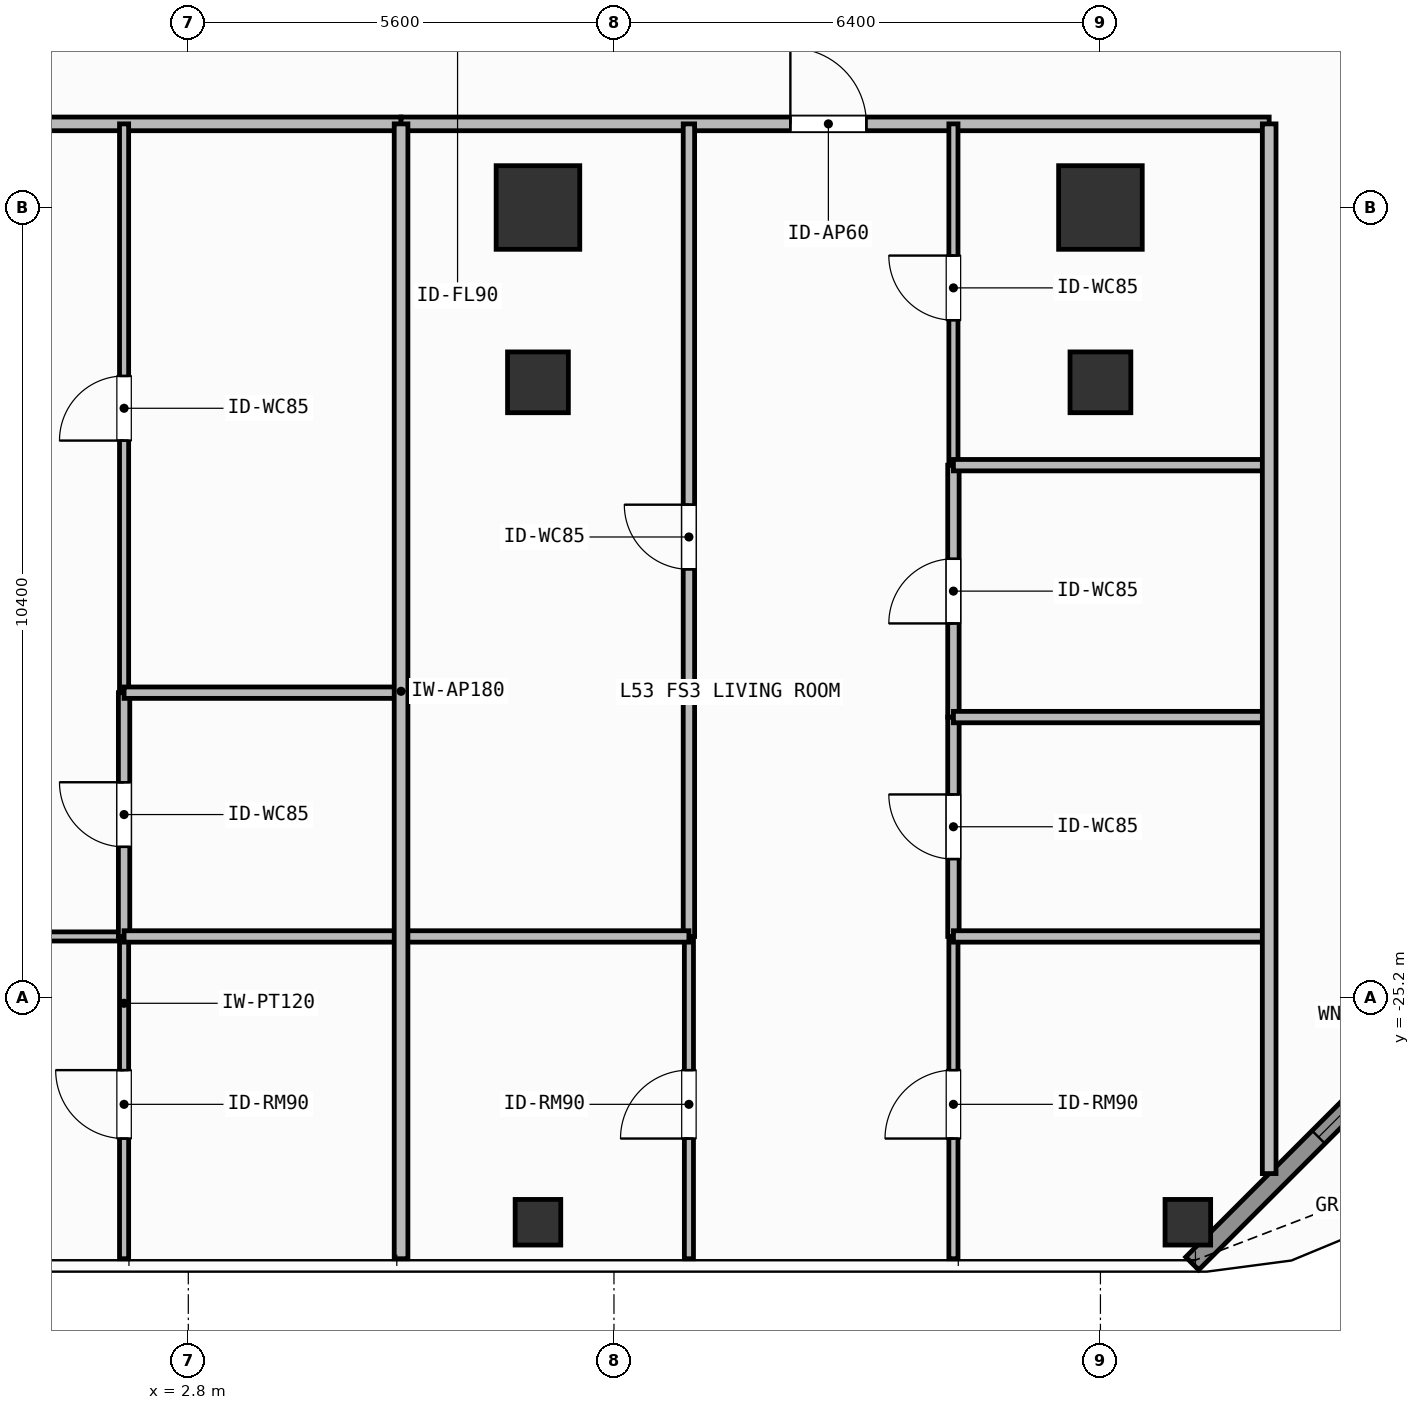
"""IFC4 building model, lengths in metres.
Left out: names, types, materials, properties, quantities, classifications, styles, units other than length and angle.
Written with IfcOpenShell. Run it as: python <this file> out.ifc"""

import sys

from ifc_helpers import new_model, si_unit, direction, frame, frame_2d, origin, origin_2d, place, context, subcontext, project, spatial, rectangle, hollow_rectangle, extrude, element, fill, save


model = new_model("IFC4")
c1 = context("Model", 3, precision=1e-05, world=origin(), true_north=direction((0.0, 1.0)))
c2 = subcontext(c1, "Body", "Model", "MODEL_VIEW")
j1 = project(units=[si_unit("LENGTHUNIT", "METRE"), si_unit("PLANEANGLEUNIT", "RADIAN")], contexts=[c1])
p1 = place(None, origin())
s1 = spatial("IfcSite", under=j1, at=p1, CompositionType="ELEMENT")
p2 = place(p1, origin())
s2 = spatial("IfcBuilding", under=s1, at=p2, CompositionType="ELEMENT")
p3 = place(p2, frame((0.0, 0.0, 215.7)))
s3 = spatial("IfcBuildingStorey", under=s2, at=p3, CompositionType="ELEMENT", Elevation=215.7)
for number, where, z_axis, x_axis in (
    (1, (7.4, -14.8, 0.0), (0.0, 0.0, 1.0), (1.0, 0.0, 0.0)),
    (2, (14.8, -14.8, 0.0), (0.0, 0.0, 1.0), (1.0, 0.0, 0.0)),
):
    element("IfcColumn", number, at=place(p3, frame(where, z_axis=z_axis, x_axis=x_axis)), inside=s3, PredefinedType="COLUMN", context=c2, shape_type="SweptSolid", body=[
        extrude(rectangle(XDim=1.1, YDim=1.1, at=origin_2d()), origin(), (0.0, 0.0, 1.0), 3.9),
    ])
for number, where, z_axis, x_axis in (
    (3, (7.4, -17.1, 0.0), (0.0, 0.0, 1.0), (1.0, 0.0, 0.0)),
    (4, (14.8, -17.1, 0.0), (0.0, 0.0, 1.0), (1.0, 0.0, 0.0)),
):
    element("IfcColumn", number, at=place(p3, frame(where, z_axis=z_axis, x_axis=x_axis)), inside=s3, PredefinedType="COLUMN", context=c2, shape_type="SweptSolid", body=[
        extrude(hollow_rectangle(XDim=0.8, YDim=0.8, WallThickness=0.036, at=origin_2d()), origin(), (0.0, 0.0, 1.0), 3.9),
    ])
for number, where, z_axis, x_axis in (
    (5, (15.95, -28.15, 0.0), (0.0, 0.0, 1.0), (1.0, 0.0, 0.0)),
    (6, (7.4, -28.15, 0.0), (0.0, 0.0, 1.0), (1.0, 0.0, 0.0)),
):
    element("IfcColumn", number, at=place(p3, frame(where, z_axis=z_axis, x_axis=x_axis)), inside=s3, PredefinedType="COLUMN", context=c2, shape_type="SweptSolid", body=[
        extrude(hollow_rectangle(XDim=0.6, YDim=0.6, WallThickness=0.028, at=origin_2d()), origin(), (0.0, 0.0, 1.0), 3.9),
    ])
p4 = place(p3, frame((20.392, -24.308, 0.0), z_axis=(0.0, 0.0, 1.0), x_axis=(-0.707106781187, -0.707106781187, 0.0)))
e7 = element("IfcWall", 7, at=p4, inside=s3, PredefinedType="SOLIDWALL", context=c2, shape_type="SweptSolid", body=[
    extrude(rectangle(XDim=6.201, YDim=0.24, at=frame_2d((3.101, 0.0))), origin(), (0.0, 0.0, 1.0), 3.62),
])
p5 = place(p4, frame((2.351, 0.0, 0.8)))
e8 = element("IfcOpeningElement", 8, at=p5, cuts=e7, PredefinedType="OPENING", context=c2, shape_type="SweptSolid", body=[
    extrude(rectangle(XDim=1.5, YDim=1.85, at=frame_2d((0.75, 0.925))), frame((0.0, 0.13, 0.0), z_axis=(0.0, -1.0, 0.0), x_axis=(1.0, 0.0, 0.0)), (0.0, 0.0, 1.0), 0.26),
])
p6 = place(p3, frame((-10.855, -13.7, 0.0), z_axis=(0.0, 0.0, 1.0), x_axis=(1.0, 0.0, 0.0)))
e9 = element("IfcWall", 9, at=p6, inside=s3, PredefinedType="PARTITIONING", context=c2, shape_type="SweptSolid", body=[
    extrude(rectangle(XDim=16.454, YDim=0.18, at=frame_2d((8.227, 0.0))), origin(), (0.0, 0.0, 1.0), 3.62),
])
p7 = place(p6, frame((8.528, 0.0, 0.0)))
e10 = element("IfcOpeningElement", 10, at=p7, cuts=e9, PredefinedType="OPENING", context=c2, shape_type="SweptSolid", body=[
    extrude(rectangle(XDim=1.0, YDim=2.2, at=frame_2d((0.5, 1.1))), frame((0.0, 0.1, 0.0), z_axis=(0.0, -1.0, 0.0), x_axis=(1.0, 0.0, 0.0)), (0.0, 0.0, 1.0), 0.2),
])
p8 = place(p3, frame((-5.293, -24.39, 0.0), z_axis=(0.0, 0.0, 1.0), x_axis=(1.0, 0.0, 0.0)))
e11 = element("IfcWall", 11, at=p8, inside=s3, PredefinedType="PARTITIONING", context=c2, shape_type="SweptSolid", body=[
    extrude(rectangle(XDim=7.248, YDim=0.12, at=frame_2d((3.624, 0.0))), origin(), (0.0, 0.0, 1.0), 3.62),
])
p9 = place(p8, frame((3.174, 0.0, 0.0)))
e12 = element("IfcOpeningElement", 12, at=p9, cuts=e11, PredefinedType="OPENING", context=c2, shape_type="SweptSolid", body=[
    extrude(rectangle(XDim=0.9, YDim=2.1, at=frame_2d((0.45, 1.05))), frame((0.0, 0.07, 0.0), z_axis=(0.0, -1.0, 0.0), x_axis=(1.0, 0.0, 0.0)), (0.0, 0.0, 1.0), 0.14),
])
p10 = place(p3, frame((1.955, -24.39, 0.0), z_axis=(0.0, 0.0, 1.0), x_axis=(0.0, 1.0, 0.0)))
e13 = element("IfcWall", 13, at=p10, inside=s3, PredefinedType="PARTITIONING", context=c2, shape_type="SweptSolid", body=[
    extrude(rectangle(XDim=3.207, YDim=0.15, at=frame_2d((1.604, 0.0))), origin(), (0.0, 0.0, 1.0), 3.62),
])
p11 = place(p10, frame((1.178, 0.0, 0.0)))
e14 = element("IfcOpeningElement", 14, at=p11, cuts=e13, PredefinedType="OPENING", context=c2, shape_type="SweptSolid", body=[
    extrude(rectangle(XDim=0.85, YDim=2.1, at=frame_2d((0.425, 1.05))), frame((0.0, 0.085, 0.0), z_axis=(0.0, -1.0, 0.0), x_axis=(1.0, 0.0, 0.0)), (0.0, 0.0, 1.0), 0.17),
])
p12 = place(p3, frame((1.955, -21.183, 0.0), z_axis=(0.0, 0.0, 1.0), x_axis=(0.0, 1.0, 0.0)))
e15 = element("IfcWall", 15, at=p12, inside=s3, PredefinedType="PARTITIONING", context=c2, shape_type="SweptSolid", body=[
    extrude(rectangle(XDim=7.483, YDim=0.12, at=frame_2d((3.742, 0.0))), origin(), (0.0, 0.0, 1.0), 3.62),
])
p13 = place(p12, frame((3.316, 0.0, 0.0)))
e16 = element("IfcOpeningElement", 16, at=p13, cuts=e15, PredefinedType="OPENING", context=c2, shape_type="SweptSolid", body=[
    extrude(rectangle(XDim=0.85, YDim=2.1, at=frame_2d((0.425, 1.05))), frame((0.0, 0.07, 0.0), z_axis=(0.0, -1.0, 0.0), x_axis=(1.0, 0.0, 0.0)), (0.0, 0.0, 1.0), 0.14),
])
p14 = place(p3, frame((1.955, -28.63, 0.0), z_axis=(0.0, 0.0, 1.0), x_axis=(0.0, 1.0, 0.0)))
e17 = element("IfcWall", 17, at=p14, inside=s3, PredefinedType="PARTITIONING", context=c2, shape_type="SweptSolid", body=[
    extrude(rectangle(XDim=4.24, YDim=0.12, at=frame_2d((2.12, 0.0))), origin(), (0.0, 0.0, 1.0), 3.62),
])
p15 = place(p14, frame((1.581, 0.0, 0.0)))
e18 = element("IfcOpeningElement", 18, at=p15, cuts=e17, PredefinedType="OPENING", context=c2, shape_type="SweptSolid", body=[
    extrude(rectangle(XDim=0.9, YDim=2.1, at=frame_2d((0.45, 1.05))), frame((0.0, 0.07, 0.0), z_axis=(0.0, -1.0, 0.0), x_axis=(1.0, 0.0, 0.0)), (0.0, 0.0, 1.0), 0.14),
])
p16 = place(p3, frame((5.599, -13.7, 0.0), z_axis=(0.0, 0.0, 1.0), x_axis=(1.0, 0.0, 0.0)))
e19 = element("IfcWall", 19, at=p16, inside=s3, PredefinedType="PARTITIONING", context=c2, shape_type="SweptSolid", body=[
    extrude(rectangle(XDim=11.421, YDim=0.18, at=frame_2d((5.71, 0.0))), origin(), (0.0, 0.0, 1.0), 3.62),
])
p17 = place(p16, frame((5.122, 0.0, 0.0)))
e20 = element("IfcOpeningElement", 20, at=p17, cuts=e19, PredefinedType="OPENING", context=c2, shape_type="SweptSolid", body=[
    extrude(rectangle(XDim=1.0, YDim=2.2, at=frame_2d((0.5, 1.1))), frame((0.0, 0.1, 0.0), z_axis=(0.0, -1.0, 0.0), x_axis=(1.0, 0.0, 0.0)), (0.0, 0.0, 1.0), 0.2),
])
p18 = place(p3, frame((9.386, -24.39, 0.0), z_axis=(0.0, 0.0, 1.0), x_axis=(0.0, 1.0, 0.0)))
e21 = element("IfcWall", 21, at=p18, inside=s3, PredefinedType="PARTITIONING", context=c2, shape_type="SweptSolid", body=[
    extrude(rectangle(XDim=10.69, YDim=0.15, at=frame_2d((5.345, 0.0))), origin(), (0.0, 0.0, 1.0), 3.62),
])
p19 = place(p18, frame((4.83, 0.0, 0.0)))
e22 = element("IfcOpeningElement", 22, at=p19, cuts=e21, PredefinedType="OPENING", context=c2, shape_type="SweptSolid", body=[
    extrude(rectangle(XDim=0.85, YDim=2.1, at=frame_2d((0.425, 1.05))), frame((0.0, 0.085, 0.0), z_axis=(0.0, -1.0, 0.0), x_axis=(1.0, 0.0, 0.0)), (0.0, 0.0, 1.0), 0.17),
])
p20 = place(p3, frame((9.386, -28.63, 0.0), z_axis=(0.0, 0.0, 1.0), x_axis=(0.0, 1.0, 0.0)))
e23 = element("IfcWall", 23, at=p20, inside=s3, PredefinedType="PARTITIONING", context=c2, shape_type="SweptSolid", body=[
    extrude(rectangle(XDim=4.24, YDim=0.12, at=frame_2d((2.12, 0.0))), origin(), (0.0, 0.0, 1.0), 3.62),
])
p21 = place(p20, frame((1.581, 0.0, 0.0)))
e24 = element("IfcOpeningElement", 24, at=p21, cuts=e23, PredefinedType="OPENING", context=c2, shape_type="SweptSolid", body=[
    extrude(rectangle(XDim=0.9, YDim=2.1, at=frame_2d((0.45, 1.05))), frame((0.0, 0.07, 0.0), z_axis=(0.0, -1.0, 0.0), x_axis=(1.0, 0.0, 0.0)), (0.0, 0.0, 1.0), 0.14),
])
p22 = place(p3, frame((12.866, -24.39, 0.0), z_axis=(0.0, 0.0, 1.0), x_axis=(0.0, 1.0, 0.0)))
e25 = element("IfcWall", 25, at=p22, inside=s3, PredefinedType="PARTITIONING", context=c2, shape_type="SweptSolid", body=[
    extrude(rectangle(XDim=2.886, YDim=0.15, at=frame_2d((1.443, 0.0))), origin(), (0.0, 0.0, 1.0), 3.62),
])
p23 = place(p22, frame((1.018, 0.0, 0.0)))
e26 = element("IfcOpeningElement", 26, at=p23, cuts=e25, PredefinedType="OPENING", context=c2, shape_type="SweptSolid", body=[
    extrude(rectangle(XDim=0.85, YDim=2.1, at=frame_2d((0.425, 1.05))), frame((0.0, 0.085, 0.0), z_axis=(0.0, -1.0, 0.0), x_axis=(1.0, 0.0, 0.0)), (0.0, 0.0, 1.0), 0.17),
])
p24 = place(p3, frame((12.866, -21.504, 0.0), z_axis=(0.0, 0.0, 1.0), x_axis=(0.0, 1.0, 0.0)))
e27 = element("IfcWall", 27, at=p24, inside=s3, PredefinedType="PARTITIONING", context=c2, shape_type="SweptSolid", body=[
    extrude(rectangle(XDim=3.314, YDim=0.15, at=frame_2d((1.657, 0.0))), origin(), (0.0, 0.0, 1.0), 3.62),
])
p25 = place(p24, frame((1.232, 0.0, 0.0)))
e28 = element("IfcOpeningElement", 28, at=p25, cuts=e27, PredefinedType="OPENING", context=c2, shape_type="SweptSolid", body=[
    extrude(rectangle(XDim=0.85, YDim=2.1, at=frame_2d((0.425, 1.05))), frame((0.0, 0.085, 0.0), z_axis=(0.0, -1.0, 0.0), x_axis=(1.0, 0.0, 0.0)), (0.0, 0.0, 1.0), 0.17),
])
p26 = place(p3, frame((12.866, -18.19, 0.0), z_axis=(0.0, 0.0, 1.0), x_axis=(0.0, 1.0, 0.0)))
e29 = element("IfcWall", 29, at=p26, inside=s3, PredefinedType="PARTITIONING", context=c2, shape_type="SweptSolid", body=[
    extrude(rectangle(XDim=4.49, YDim=0.12, at=frame_2d((2.245, 0.0))), origin(), (0.0, 0.0, 1.0), 3.62),
])
p27 = place(p26, frame((1.907, 0.0, 0.0)))
e30 = element("IfcOpeningElement", 30, at=p27, cuts=e29, PredefinedType="OPENING", context=c2, shape_type="SweptSolid", body=[
    extrude(rectangle(XDim=0.85, YDim=2.1, at=frame_2d((0.425, 1.05))), frame((0.0, 0.07, 0.0), z_axis=(0.0, -1.0, 0.0), x_axis=(1.0, 0.0, 0.0)), (0.0, 0.0, 1.0), 0.14),
])
p28 = place(p3, frame((12.866, -28.63, 0.0), z_axis=(0.0, 0.0, 1.0), x_axis=(0.0, 1.0, 0.0)))
e31 = element("IfcWall", 31, at=p28, inside=s3, PredefinedType="PARTITIONING", context=c2, shape_type="SweptSolid", body=[
    extrude(rectangle(XDim=4.24, YDim=0.12, at=frame_2d((2.12, 0.0))), origin(), (0.0, 0.0, 1.0), 3.62),
])
p29 = place(p28, frame((1.581, 0.0, 0.0)))
e32 = element("IfcOpeningElement", 32, at=p29, cuts=e31, PredefinedType="OPENING", context=c2, shape_type="SweptSolid", body=[
    extrude(rectangle(XDim=0.9, YDim=2.1, at=frame_2d((0.45, 1.05))), frame((0.0, 0.07, 0.0), z_axis=(0.0, -1.0, 0.0), x_axis=(1.0, 0.0, 0.0)), (0.0, 0.0, 1.0), 0.14),
])
for number, where, z_axis, x_axis in (
    (33, (1.955, -21.183, 0.0), (0.0, 0.0, 1.0), (1.0, 0.0, 0.0)),
    (34, (1.955, -24.39, 0.0), (0.0, 0.0, 1.0), (1.0, 0.0, 0.0)),
):
    element("IfcWall", number, at=place(p3, frame(where, z_axis=z_axis, x_axis=x_axis)), inside=s3, PredefinedType="PARTITIONING", context=c2, shape_type="SweptSolid", body=[
        extrude(rectangle(XDim=3.644, YDim=0.15, at=frame_2d((1.822, 0.0))), origin(), (0.0, 0.0, 1.0), 3.62),
    ])
p30 = place(p3, frame((5.599, -24.39, 0.0), z_axis=(0.0, 0.0, 1.0), x_axis=(1.0, 0.0, 0.0)))
e35 = element("IfcWall", 35, at=p30, inside=s3, PredefinedType="PARTITIONING", context=c2, shape_type="SweptSolid", body=[
    extrude(rectangle(XDim=3.787, YDim=0.15, at=frame_2d((1.894, 0.0))), origin(), (0.0, 0.0, 1.0), 3.62),
])
p31 = place(p3, frame((12.866, -21.504, 0.0), z_axis=(0.0, 0.0, 1.0), x_axis=(1.0, 0.0, 0.0)))
e36 = element("IfcWall", 36, at=p31, inside=s3, PredefinedType="PARTITIONING", context=c2, shape_type="SweptSolid", body=[
    extrude(rectangle(XDim=4.154, YDim=0.15, at=frame_2d((2.077, 0.0))), origin(), (0.0, 0.0, 1.0), 3.36),
])
for number, where, z_axis, x_axis in (
    (37, (12.866, -18.19, 0.0), (0.0, 0.0, 1.0), (1.0, 0.0, 0.0)),
    (38, (12.866, -24.39, 0.0), (0.0, 0.0, 1.0), (1.0, 0.0, 0.0)),
):
    element("IfcWall", number, at=place(p3, frame(where, z_axis=z_axis, x_axis=x_axis)), inside=s3, PredefinedType="PARTITIONING", context=c2, shape_type="SweptSolid", body=[
        extrude(rectangle(XDim=4.154, YDim=0.15, at=frame_2d((2.077, 0.0))), origin(), (0.0, 0.0, 1.0), 3.62),
    ])
p32 = place(p3, frame((5.599, -28.63, 0.0), z_axis=(0.0, 0.0, 1.0), x_axis=(0.0, 1.0, 0.0)))
e39 = element("IfcWall", 39, at=p32, inside=s3, PredefinedType="PARTITIONING", context=c2, shape_type="SweptSolid", body=[
    extrude(rectangle(XDim=14.93, YDim=0.18, at=frame_2d((7.465, 0.0))), origin(), (0.0, 0.0, 1.0), 3.62),
])
p33 = place(p3, frame((17.02, -27.51, 0.0), z_axis=(0.0, 0.0, 1.0), x_axis=(0.0, 1.0, 0.0)))
e40 = element("IfcWall", 40, at=p33, inside=s3, PredefinedType="PARTITIONING", context=c2, shape_type="SweptSolid", body=[
    extrude(rectangle(XDim=13.81, YDim=0.18, at=frame_2d((6.905, 0.0))), origin(), (0.0, 0.0, 1.0), 3.62),
])
p34 = place(p5, origin())
e41 = element("IfcWindow", 41, at=p34, inside=s3, PartitioningType="SINGLE_PANEL", PredefinedType="WINDOW", context=c2, shape_type="SweptSolid", body=[
    extrude(rectangle(XDim=1.5, YDim=1.85, at=frame_2d((0.75, 0.925))), frame((0.0, 0.03, 0.0), z_axis=(0.0, -1.0, 0.0), x_axis=(1.0, 0.0, 0.0)), (0.0, 0.0, 1.0), 0.06),
])
fill(e8, e41)
p35 = place(p11, origin())
e42 = element("IfcDoor", 42, at=p35, inside=s3, OperationType="SINGLE_SWING_RIGHT", PredefinedType="DOOR", context=c2, shape_type="SweptSolid", body=[
    extrude(rectangle(XDim=0.85, YDim=2.1, at=frame_2d((0.425, 1.05))), frame((0.0, 0.025, 0.0), z_axis=(0.0, -1.0, 0.0), x_axis=(1.0, 0.0, 0.0)), (0.0, 0.0, 1.0), 0.05),
])
fill(e14, e42)
p36 = place(p13, origin())
e43 = element("IfcDoor", 43, at=p36, inside=s3, OperationType="SINGLE_SWING_LEFT", PredefinedType="DOOR", context=c2, shape_type="SweptSolid", body=[
    extrude(rectangle(XDim=0.85, YDim=2.1, at=frame_2d((0.425, 1.05))), frame((0.0, 0.025, 0.0), z_axis=(0.0, -1.0, 0.0), x_axis=(1.0, 0.0, 0.0)), (0.0, 0.0, 1.0), 0.05),
])
fill(e16, e43)
p37 = place(p15, origin())
e44 = element("IfcDoor", 44, at=p37, inside=s3, OperationType="SINGLE_SWING_RIGHT", PredefinedType="DOOR", context=c2, shape_type="SweptSolid", body=[
    extrude(rectangle(XDim=0.9, YDim=2.1, at=frame_2d((0.45, 1.05))), frame((0.0, 0.025, 0.0), z_axis=(0.0, -1.0, 0.0), x_axis=(1.0, 0.0, 0.0)), (0.0, 0.0, 1.0), 0.05),
])
fill(e18, e44)
p38 = place(p17, origin())
e45 = element("IfcDoor", 45, at=p38, inside=s3, OperationType="SINGLE_SWING_LEFT", PredefinedType="DOOR", context=c2, shape_type="SweptSolid", body=[
    extrude(rectangle(XDim=1.0, YDim=2.2, at=frame_2d((0.5, 1.1))), frame((0.0, 0.025, 0.0), z_axis=(0.0, -1.0, 0.0), x_axis=(1.0, 0.0, 0.0)), (0.0, 0.0, 1.0), 0.05),
])
fill(e20, e45)
p39 = place(p19, origin())
e46 = element("IfcDoor", 46, at=p39, inside=s3, OperationType="SINGLE_SWING_RIGHT", PredefinedType="DOOR", context=c2, shape_type="SweptSolid", body=[
    extrude(rectangle(XDim=0.85, YDim=2.1, at=frame_2d((0.425, 1.05))), frame((0.0, 0.025, 0.0), z_axis=(0.0, -1.0, 0.0), x_axis=(1.0, 0.0, 0.0)), (0.0, 0.0, 1.0), 0.05),
])
fill(e22, e46)
p40 = place(p21, origin())
e47 = element("IfcDoor", 47, at=p40, inside=s3, OperationType="SINGLE_SWING_LEFT", PredefinedType="DOOR", context=c2, shape_type="SweptSolid", body=[
    extrude(rectangle(XDim=0.9, YDim=2.1, at=frame_2d((0.45, 1.05))), frame((0.0, 0.025, 0.0), z_axis=(0.0, -1.0, 0.0), x_axis=(1.0, 0.0, 0.0)), (0.0, 0.0, 1.0), 0.05),
])
fill(e24, e47)
p41 = place(p23, origin())
e48 = element("IfcDoor", 48, at=p41, inside=s3, OperationType="SINGLE_SWING_RIGHT", PredefinedType="DOOR", context=c2, shape_type="SweptSolid", body=[
    extrude(rectangle(XDim=0.85, YDim=2.1, at=frame_2d((0.425, 1.05))), frame((0.0, 0.025, 0.0), z_axis=(0.0, -1.0, 0.0), x_axis=(1.0, 0.0, 0.0)), (0.0, 0.0, 1.0), 0.05),
])
fill(e26, e48)
p42 = place(p25, origin())
e49 = element("IfcDoor", 49, at=p42, inside=s3, OperationType="SINGLE_SWING_LEFT", PredefinedType="DOOR", context=c2, shape_type="SweptSolid", body=[
    extrude(rectangle(XDim=0.85, YDim=2.1, at=frame_2d((0.425, 1.05))), frame((0.0, 0.025, 0.0), z_axis=(0.0, -1.0, 0.0), x_axis=(1.0, 0.0, 0.0)), (0.0, 0.0, 1.0), 0.05),
])
fill(e28, e49)
p43 = place(p27, origin())
e50 = element("IfcDoor", 50, at=p43, inside=s3, OperationType="SINGLE_SWING_RIGHT", PredefinedType="DOOR", context=c2, shape_type="SweptSolid", body=[
    extrude(rectangle(XDim=0.85, YDim=2.1, at=frame_2d((0.425, 1.05))), frame((0.0, 0.025, 0.0), z_axis=(0.0, -1.0, 0.0), x_axis=(1.0, 0.0, 0.0)), (0.0, 0.0, 1.0), 0.05),
])
fill(e30, e50)
p44 = place(p29, origin())
e51 = element("IfcDoor", 51, at=p44, inside=s3, OperationType="SINGLE_SWING_LEFT", PredefinedType="DOOR", context=c2, shape_type="SweptSolid", body=[
    extrude(rectangle(XDim=0.9, YDim=2.1, at=frame_2d((0.45, 1.05))), frame((0.0, 0.025, 0.0), z_axis=(0.0, -1.0, 0.0), x_axis=(1.0, 0.0, 0.0)), (0.0, 0.0, 1.0), 0.05),
])
fill(e32, e51)
save(model, sys.argv[1])
